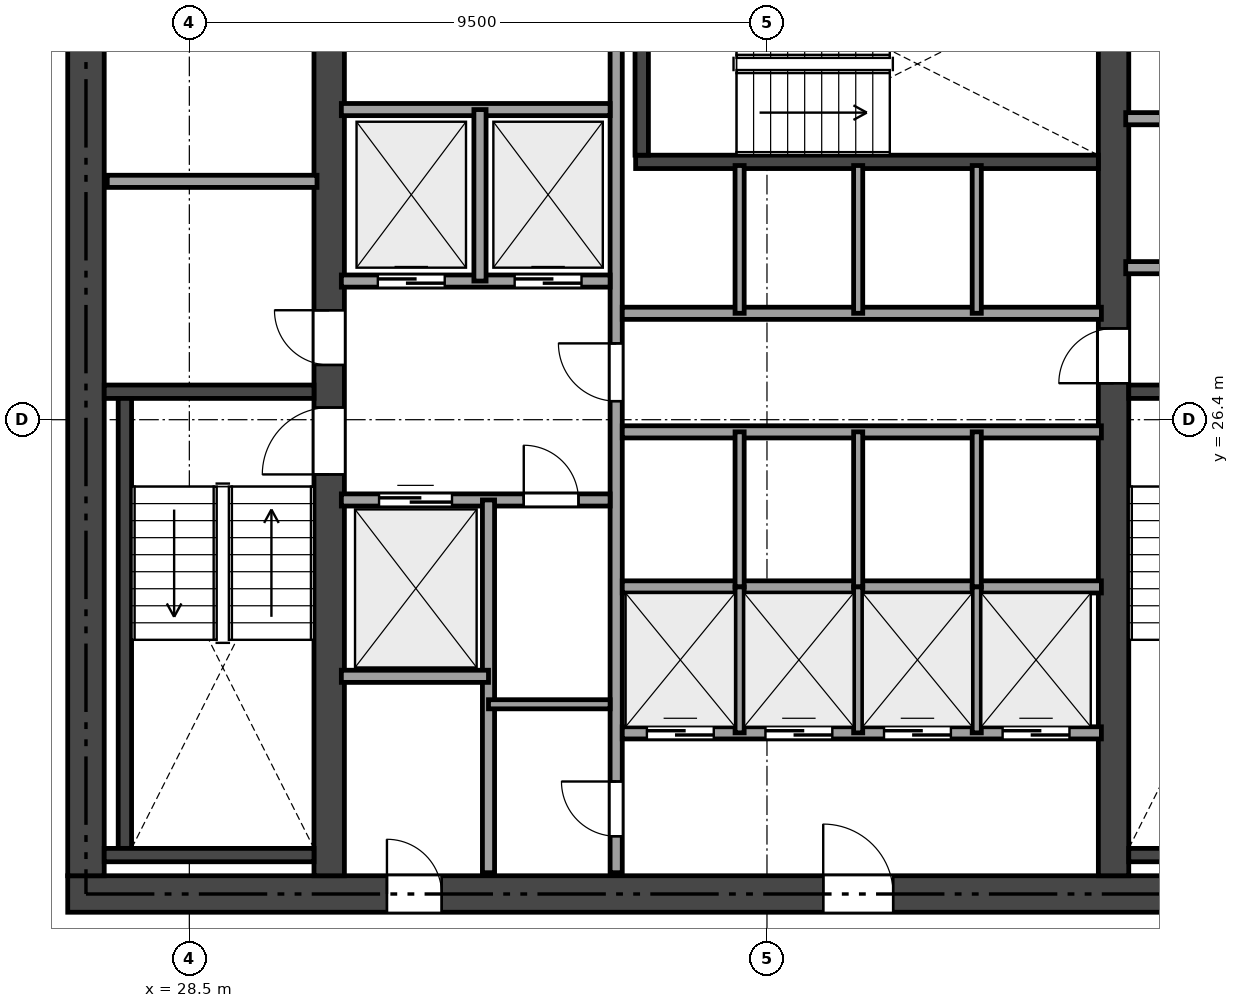
"""IFC4 building model, lengths in metres.
Left out: names, types, materials, properties, quantities, classifications, styles, units other than length and angle.
Written with IfcOpenShell. Run it as: python <this file> out.ifc"""

import sys

from ifc_helpers import new_model, si_unit, direction, frame, frame_2d, origin, place, context, subcontext, project, spatial, rectangle, extrude, element, fill, save


model = new_model("IFC4")
c1 = context("Model", 3, precision=1e-05, world=origin(), true_north=direction((0.0, 1.0)))
c2 = subcontext(c1, "Body", "Model", "MODEL_VIEW")
j1 = project(units=[si_unit("LENGTHUNIT", "METRE"), si_unit("PLANEANGLEUNIT", "RADIAN")], contexts=[c1])
p1 = place(None, origin())
s1 = spatial("IfcSite", under=j1, at=p1, CompositionType="ELEMENT")
p2 = place(p1, origin())
s2 = spatial("IfcBuilding", under=s1, at=p2, CompositionType="ELEMENT")
p3 = place(p2, frame((0.0, 0.0, 117.75)))
s3 = spatial("IfcBuildingStorey", under=s2, at=p3, CompositionType="ELEMENT", Elevation=117.75)
p4 = place(p3, frame((26.5, 18.6, 0.0), z_axis=(0.0, 0.0, 1.0), x_axis=(1.0, 0.0, 0.0)))
e1 = element("IfcWall", 1, at=p4, inside=s3, PredefinedType="SHEAR", context=c2, shape_type="SweptSolid", body=[
    extrude(rectangle(XDim=21.4, YDim=0.6, at=frame_2d((10.7, 0.0))), origin(), (0.0, 0.0, 1.0), 3.09),
])
p5 = place(p4, frame((12.425, 0.0, 0.0)))
e2 = element("IfcOpeningElement", 2, at=p5, cuts=e1, PredefinedType="OPENING", context=c2, shape_type="SweptSolid", body=[
    extrude(rectangle(XDim=1.15, YDim=2.15, at=frame_2d((0.575, 1.075))), frame((0.0, 0.31, 0.0), z_axis=(0.0, -1.0, 0.0), x_axis=(1.0, 0.0, 0.0)), (0.0, 0.0, 1.0), 0.62),
])
p6 = place(p4, frame((5.25, 0.0, 0.0)))
e3 = element("IfcOpeningElement", 3, at=p6, cuts=e1, PredefinedType="OPENING", context=c2, shape_type="SweptSolid", body=[
    extrude(rectangle(XDim=0.9, YDim=2.1, at=frame_2d((0.45, 1.05))), frame((0.0, 0.31, 0.0), z_axis=(0.0, -1.0, 0.0), x_axis=(1.0, 0.0, 0.0)), (0.0, 0.0, 1.0), 0.62),
])
p7 = place(p3, frame((26.8, 18.9, 0.0), z_axis=(0.0, 0.0, 1.0), x_axis=(0.0, 1.0, 0.0)))
e4 = element("IfcWall", 4, at=p7, inside=s3, PredefinedType="SHEAR", context=c2, shape_type="SweptSolid", body=[
    extrude(rectangle(XDim=15.0, YDim=0.6, at=frame_2d((7.5, 0.0))), origin(), (0.0, 0.0, 1.0), 3.09),
])
p8 = place(p3, frame((30.8, 18.9, 0.0), z_axis=(0.0, 0.0, 1.0), x_axis=(0.0, 1.0, 0.0)))
e5 = element("IfcWall", 5, at=p8, inside=s3, PredefinedType="SHEAR", context=c2, shape_type="SweptSolid", body=[
    extrude(rectangle(XDim=15.0, YDim=0.5, at=frame_2d((7.5, 0.0))), origin(), (0.0, 0.0, 1.0), 3.09),
])
p9 = place(p8, frame((6.6, 0.0, 0.0)))
e6 = element("IfcOpeningElement", 6, at=p9, cuts=e5, PredefinedType="OPENING", context=c2, shape_type="SweptSolid", body=[
    extrude(rectangle(XDim=1.1, YDim=2.15, at=frame_2d((0.55, 1.075))), frame((0.0, 0.26, 0.0), z_axis=(0.0, -1.0, 0.0), x_axis=(1.0, 0.0, 0.0)), (0.0, 0.0, 1.0), 0.52),
])
p10 = place(p8, frame((8.4, 0.0, 0.0)))
e7 = element("IfcOpeningElement", 7, at=p10, cuts=e5, PredefinedType="OPENING", context=c2, shape_type="SweptSolid", body=[
    extrude(rectangle(XDim=0.9, YDim=2.1, at=frame_2d((0.45, 1.05))), frame((0.0, 0.26, 0.0), z_axis=(0.0, -1.0, 0.0), x_axis=(1.0, 0.0, 0.0)), (0.0, 0.0, 1.0), 0.52),
])
p11 = place(p3, frame((43.7, 18.9, 0.0), z_axis=(0.0, 0.0, 1.0), x_axis=(0.0, 1.0, 0.0)))
e8 = element("IfcWall", 8, at=p11, inside=s3, PredefinedType="SHEAR", context=c2, shape_type="SweptSolid", body=[
    extrude(rectangle(XDim=15.0, YDim=0.5, at=frame_2d((7.5, 0.0))), origin(), (0.0, 0.0, 1.0), 3.09),
])
p12 = place(p11, frame((8.1, 0.0, 0.0)))
e9 = element("IfcOpeningElement", 9, at=p12, cuts=e8, PredefinedType="OPENING", context=c2, shape_type="SweptSolid", body=[
    extrude(rectangle(XDim=0.9, YDim=2.1, at=frame_2d((0.45, 1.05))), frame((0.0, 0.26, 0.0), z_axis=(0.0, -1.0, 0.0), x_axis=(1.0, 0.0, 0.0)), (0.0, 0.0, 1.0), 0.52),
])
p13 = place(p3, frame((27.1, 26.86, 0.0), z_axis=(0.0, 0.0, 1.0), x_axis=(1.0, 0.0, 0.0)))
e10 = element("IfcWall", 10, at=p13, inside=s3, PredefinedType="SHEAR", context=c2, shape_type="SweptSolid", body=[
    extrude(rectangle(XDim=3.45, YDim=0.22, at=frame_2d((1.725, 0.0))), origin(), (0.0, 0.0, 1.0), 3.09),
])
p14 = place(p3, frame((27.44, 19.35, 0.0), z_axis=(0.0, 0.0, 1.0), x_axis=(0.0, 1.0, 0.0)))
e11 = element("IfcWall", 11, at=p14, inside=s3, PredefinedType="SHEAR", context=c2, shape_type="SweptSolid", body=[
    extrude(rectangle(XDim=7.4, YDim=0.22, at=frame_2d((3.7, 0.0))), origin(), (0.0, 0.0, 1.0), 3.09),
])
p15 = place(p3, frame((27.1, 19.24, 0.0), z_axis=(0.0, 0.0, 1.0), x_axis=(1.0, 0.0, 0.0)))
e12 = element("IfcWall", 12, at=p15, inside=s3, PredefinedType="SHEAR", context=c2, shape_type="SweptSolid", body=[
    extrude(rectangle(XDim=3.45, YDim=0.22, at=frame_2d((1.725, 0.0))), origin(), (0.0, 0.0, 1.0), 3.09),
])
for number, where, z_axis, x_axis in (
    (13, (43.95, 26.86, 0.0), (0.0, 0.0, 1.0), (1.0, 0.0, 0.0)),
    (14, (43.95, 19.24, 0.0), (0.0, 0.0, 1.0), (1.0, 0.0, 0.0)),
):
    element("IfcWall", number, at=place(p3, frame(where, z_axis=z_axis, x_axis=x_axis)), inside=s3, PredefinedType="SHEAR", context=c2, shape_type="SweptSolid", body=[
        extrude(rectangle(XDim=3.35, YDim=0.22, at=frame_2d((1.675, 0.0))), origin(), (0.0, 0.0, 1.0), 3.09),
    ])
p16 = place(p3, frame((35.84, 30.64, 0.0), z_axis=(0.0, 0.0, 1.0), x_axis=(1.0, 0.0, 0.0)))
e15 = element("IfcWall", 15, at=p16, inside=s3, PredefinedType="SHEAR", context=c2, shape_type="SweptSolid", body=[
    extrude(rectangle(XDim=7.61, YDim=0.22, at=frame_2d((3.805, 0.0))), origin(), (0.0, 0.0, 1.0), 3.09),
])
p17 = place(p3, frame((35.94, 30.75, 0.0), z_axis=(0.0, 0.0, 1.0), x_axis=(0.0, 1.0, 0.0)))
e16 = element("IfcWall", 16, at=p17, inside=s3, PredefinedType="SHEAR", context=c2, shape_type="SweptSolid", body=[
    extrude(rectangle(XDim=3.15, YDim=0.22, at=frame_2d((1.575, 0.0))), origin(), (0.0, 0.0, 1.0), 3.09),
])
p18 = place(p3, frame((27.15, 30.32, 0.0), z_axis=(0.0, 0.0, 1.0), x_axis=(1.0, 0.0, 0.0)))
e17 = element("IfcWall", 17, at=p18, inside=s3, PredefinedType="SOLIDWALL", context=c2, shape_type="SweptSolid", body=[
    extrude(rectangle(XDim=3.45, YDim=0.2, at=frame_2d((1.725, 0.0))), origin(), (0.0, 0.0, 1.0), 3.09),
])
p19 = place(p3, frame((43.9, 28.9, 0.0), z_axis=(0.0, 0.0, 1.0), x_axis=(1.0, 0.0, 0.0)))
e18 = element("IfcWall", 18, at=p19, inside=s3, PredefinedType="SOLIDWALL", context=c2, shape_type="SweptSolid", body=[
    extrude(rectangle(XDim=3.35, YDim=0.2, at=frame_2d((1.675, 0.0))), origin(), (0.0, 0.0, 1.0), 3.09),
])
p20 = place(p19, frame((1.15, 0.0, 0.0)))
e19 = element("IfcOpeningElement", 19, at=p20, cuts=e18, PredefinedType="OPENING", context=c2, shape_type="SweptSolid", body=[
    extrude(rectangle(XDim=0.9, YDim=2.1, at=frame_2d((0.45, 1.05))), frame((0.0, 0.11, 0.0), z_axis=(0.0, -1.0, 0.0), x_axis=(1.0, 0.0, 0.0)), (0.0, 0.0, 1.0), 0.22),
])
p21 = place(p3, frame((43.9, 31.35, 0.0), z_axis=(0.0, 0.0, 1.0), x_axis=(1.0, 0.0, 0.0)))
e20 = element("IfcWall", 20, at=p21, inside=s3, PredefinedType="SOLIDWALL", context=c2, shape_type="SweptSolid", body=[
    extrude(rectangle(XDim=3.35, YDim=0.2, at=frame_2d((1.675, 0.0))), origin(), (0.0, 0.0, 1.0), 3.09),
])
p22 = place(p3, frame((35.52, 18.95, 0.0), z_axis=(0.0, 0.0, 1.0), x_axis=(0.0, 1.0, 0.0)))
e21 = element("IfcWall", 21, at=p22, inside=s3, PredefinedType="SOLIDWALL", context=c2, shape_type="SweptSolid", body=[
    extrude(rectangle(XDim=14.9, YDim=0.2, at=frame_2d((7.45, 0.0))), origin(), (0.0, 0.0, 1.0), 2.611),
])
p23 = place(p22, frame((7.755, 0.0, 0.0)))
e22 = element("IfcOpeningElement", 22, at=p23, cuts=e21, PredefinedType="OPENING", context=c2, shape_type="SweptSolid", body=[
    extrude(rectangle(XDim=0.95, YDim=2.15, at=frame_2d((0.475, 1.075))), frame((0.0, 0.11, 0.0), z_axis=(0.0, -1.0, 0.0), x_axis=(1.0, 0.0, 0.0)), (0.0, 0.0, 1.0), 0.22),
])
p24 = place(p22, frame((0.6, 0.0, 0.0)))
e23 = element("IfcOpeningElement", 23, at=p24, cuts=e21, PredefinedType="OPENING", context=c2, shape_type="SweptSolid", body=[
    extrude(rectangle(XDim=0.9, YDim=2.1, at=frame_2d((0.45, 1.05))), frame((0.0, 0.11, 0.0), z_axis=(0.0, -1.0, 0.0), x_axis=(1.0, 0.0, 0.0)), (0.0, 0.0, 1.0), 0.22),
])
p25 = place(p3, frame((31.0, 28.68, 0.0), z_axis=(0.0, 0.0, 1.0), x_axis=(1.0, 0.0, 0.0)))
e24 = element("IfcWall", 24, at=p25, inside=s3, PredefinedType="SOLIDWALL", context=c2, shape_type="SweptSolid", body=[
    extrude(rectangle(XDim=4.42, YDim=0.2, at=frame_2d((2.21, 0.0))), origin(), (0.0, 0.0, 1.0), 3.09),
])
p26 = place(p25, frame((0.6, 0.0, 0.0)))
e25 = element("IfcOpeningElement", 25, at=p26, cuts=e24, PredefinedType="OPENING", context=c2, shape_type="SweptSolid", body=[
    extrude(rectangle(XDim=1.1, YDim=2.15, at=frame_2d((0.55, 1.075))), frame((0.0, 0.11, 0.0), z_axis=(0.0, -1.0, 0.0), x_axis=(1.0, 0.0, 0.0)), (0.0, 0.0, 1.0), 0.22),
])
p27 = place(p25, frame((2.85, 0.0, 0.0)))
e26 = element("IfcOpeningElement", 26, at=p27, cuts=e24, PredefinedType="OPENING", context=c2, shape_type="SweptSolid", body=[
    extrude(rectangle(XDim=1.1, YDim=2.15, at=frame_2d((0.55, 1.075))), frame((0.0, 0.11, 0.0), z_axis=(0.0, -1.0, 0.0), x_axis=(1.0, 0.0, 0.0)), (0.0, 0.0, 1.0), 0.22),
])
p28 = place(p3, frame((31.0, 31.5, 0.0), z_axis=(0.0, 0.0, 1.0), x_axis=(1.0, 0.0, 0.0)))
e27 = element("IfcWall", 27, at=p28, inside=s3, PredefinedType="SOLIDWALL", context=c2, shape_type="SweptSolid", body=[
    extrude(rectangle(XDim=4.42, YDim=0.2, at=frame_2d((2.21, 0.0))), origin(), (0.0, 0.0, 1.0), 3.09),
])
p29 = place(p3, frame((33.28, 28.68, 0.0), z_axis=(0.0, 0.0, 1.0), x_axis=(0.0, 1.0, 0.0)))
e28 = element("IfcWall", 28, at=p29, inside=s3, PredefinedType="SOLIDWALL", context=c2, shape_type="SweptSolid", body=[
    extrude(rectangle(XDim=2.82, YDim=0.2, at=frame_2d((1.41, 0.0))), origin(), (0.0, 0.0, 1.0), 3.09),
])
p30 = place(p3, frame((31.0, 25.08, 0.0), z_axis=(0.0, 0.0, 1.0), x_axis=(1.0, 0.0, 0.0)))
e29 = element("IfcWall", 29, at=p30, inside=s3, PredefinedType="SOLIDWALL", context=c2, shape_type="SweptSolid", body=[
    extrude(rectangle(XDim=4.42, YDim=0.2, at=frame_2d((2.21, 0.0))), origin(), (0.0, 0.0, 1.0), 3.09),
])
p31 = place(p30, frame((3.0, 0.0, 0.0)))
e30 = element("IfcOpeningElement", 30, at=p31, cuts=e29, PredefinedType="OPENING", context=c2, shape_type="SweptSolid", body=[
    extrude(rectangle(XDim=0.9, YDim=2.1, at=frame_2d((0.45, 1.05))), frame((0.0, 0.11, 0.0), z_axis=(0.0, -1.0, 0.0), x_axis=(1.0, 0.0, 0.0)), (0.0, 0.0, 1.0), 0.22),
])
p32 = place(p30, frame((0.62, 0.0, 0.0)))
e31 = element("IfcOpeningElement", 31, at=p32, cuts=e29, PredefinedType="OPENING", context=c2, shape_type="SweptSolid", body=[
    extrude(rectangle(XDim=1.2, YDim=2.15, at=frame_2d((0.6, 1.075))), frame((0.0, 0.11, 0.0), z_axis=(0.0, -1.0, 0.0), x_axis=(1.0, 0.0, 0.0)), (0.0, 0.0, 1.0), 0.22),
])
p33 = place(p3, frame((33.42, 18.95, 0.0), z_axis=(0.0, 0.0, 1.0), x_axis=(0.0, 1.0, 0.0)))
e32 = element("IfcWall", 32, at=p33, inside=s3, PredefinedType="SOLIDWALL", context=c2, shape_type="SweptSolid", body=[
    extrude(rectangle(XDim=6.13, YDim=0.2, at=frame_2d((3.065, 0.0))), origin(), (0.0, 0.0, 1.0), 2.611),
])
p34 = place(p3, frame((31.0, 22.18, 0.0), z_axis=(0.0, 0.0, 1.0), x_axis=(1.0, 0.0, 0.0)))
e33 = element("IfcWall", 33, at=p34, inside=s3, PredefinedType="SOLIDWALL", context=c2, shape_type="SweptSolid", body=[
    extrude(rectangle(XDim=2.42, YDim=0.2, at=frame_2d((1.21, 0.0))), origin(), (0.0, 0.0, 1.0), 3.09),
])
p35 = place(p3, frame((33.42, 21.72, 0.0), z_axis=(0.0, 0.0, 1.0), x_axis=(1.0, 0.0, 0.0)))
e34 = element("IfcWall", 34, at=p35, inside=s3, PredefinedType="PARTITIONING", context=c2, shape_type="SweptSolid", body=[
    extrude(rectangle(XDim=2.0, YDim=0.15, at=frame_2d((1.0, 0.0))), origin(), (0.0, 0.0, 1.0), 3.09),
])
for number, where, z_axis, x_axis in (
    (35, (35.62, 28.15, 0.0), (0.0, 0.0, 1.0), (1.0, 0.0, 0.0)),
    (36, (35.62, 26.2, 0.0), (0.0, 0.0, 1.0), (1.0, 0.0, 0.0)),
):
    element("IfcWall", number, at=place(p3, frame(where, z_axis=z_axis, x_axis=x_axis)), inside=s3, PredefinedType="SOLIDWALL", context=c2, shape_type="SweptSolid", body=[
        extrude(rectangle(XDim=7.88, YDim=0.2, at=frame_2d((3.94, 0.0))), origin(), (0.0, 0.0, 1.0), 3.09),
    ])
p36 = place(p3, frame((35.62, 23.65, 0.0), z_axis=(0.0, 0.0, 1.0), x_axis=(1.0, 0.0, 0.0)))
e37 = element("IfcWall", 37, at=p36, inside=s3, PredefinedType="SOLIDWALL", context=c2, shape_type="SweptSolid", body=[
    extrude(rectangle(XDim=7.88, YDim=0.2, at=frame_2d((3.94, 0.0))), origin(), (0.0, 0.0, 1.0), 2.611),
])
p37 = place(p3, frame((35.62, 21.25, 0.0), z_axis=(0.0, 0.0, 1.0), x_axis=(1.0, 0.0, 0.0)))
e38 = element("IfcWall", 38, at=p37, inside=s3, PredefinedType="SOLIDWALL", context=c2, shape_type="SweptSolid", body=[
    extrude(rectangle(XDim=7.88, YDim=0.2, at=frame_2d((3.94, 0.0))), origin(), (0.0, 0.0, 1.0), 3.09),
])
p38 = place(p37, frame((0.405, 0.0, 0.0)))
e39 = element("IfcOpeningElement", 39, at=p38, cuts=e38, PredefinedType="OPENING", context=c2, shape_type="SweptSolid", body=[
    extrude(rectangle(XDim=1.1, YDim=2.15, at=frame_2d((0.55, 1.075))), frame((0.0, 0.11, 0.0), z_axis=(0.0, -1.0, 0.0), x_axis=(1.0, 0.0, 0.0)), (0.0, 0.0, 1.0), 0.22),
])
p39 = place(p37, frame((2.355, 0.0, 0.0)))
e40 = element("IfcOpeningElement", 40, at=p39, cuts=e38, PredefinedType="OPENING", context=c2, shape_type="SweptSolid", body=[
    extrude(rectangle(XDim=1.1, YDim=2.15, at=frame_2d((0.55, 1.075))), frame((0.0, 0.11, 0.0), z_axis=(0.0, -1.0, 0.0), x_axis=(1.0, 0.0, 0.0)), (0.0, 0.0, 1.0), 0.22),
])
p40 = place(p37, frame((4.305, 0.0, 0.0)))
e41 = element("IfcOpeningElement", 41, at=p40, cuts=e38, PredefinedType="OPENING", context=c2, shape_type="SweptSolid", body=[
    extrude(rectangle(XDim=1.1, YDim=2.15, at=frame_2d((0.55, 1.075))), frame((0.0, 0.11, 0.0), z_axis=(0.0, -1.0, 0.0), x_axis=(1.0, 0.0, 0.0)), (0.0, 0.0, 1.0), 0.22),
])
p41 = place(p37, frame((6.255, 0.0, 0.0)))
e42 = element("IfcOpeningElement", 42, at=p41, cuts=e38, PredefinedType="OPENING", context=c2, shape_type="SweptSolid", body=[
    extrude(rectangle(XDim=1.1, YDim=2.15, at=frame_2d((0.55, 1.075))), frame((0.0, 0.11, 0.0), z_axis=(0.0, -1.0, 0.0), x_axis=(1.0, 0.0, 0.0)), (0.0, 0.0, 1.0), 0.22),
])
for number, where, z_axis, x_axis in (
    (43, (37.55, 28.15, 0.0), (0.0, 0.0, 1.0), (0.0, 1.0, 0.0)),
    (44, (39.5, 28.15, 0.0), (0.0, 0.0, 1.0), (0.0, 1.0, 0.0)),
    (45, (41.45, 28.15, 0.0), (0.0, 0.0, 1.0), (0.0, 1.0, 0.0)),
):
    element("IfcWall", number, at=place(p3, frame(where, z_axis=z_axis, x_axis=x_axis)), inside=s3, PredefinedType="PARTITIONING", context=c2, shape_type="SweptSolid", body=[
        extrude(rectangle(XDim=2.43, YDim=0.15, at=frame_2d((1.215, 0.0))), origin(), (0.0, 0.0, 1.0), 3.09),
    ])
for number, where, z_axis, x_axis in (
    (46, (37.55, 23.65, 0.0), (0.0, 0.0, 1.0), (0.0, 1.0, 0.0)),
    (47, (39.5, 23.65, 0.0), (0.0, 0.0, 1.0), (0.0, 1.0, 0.0)),
    (48, (41.45, 23.65, 0.0), (0.0, 0.0, 1.0), (0.0, 1.0, 0.0)),
):
    element("IfcWall", number, at=place(p3, frame(where, z_axis=z_axis, x_axis=x_axis)), inside=s3, PredefinedType="PARTITIONING", context=c2, shape_type="SweptSolid", body=[
        extrude(rectangle(XDim=2.55, YDim=0.15, at=frame_2d((1.275, 0.0))), origin(), (0.0, 0.0, 1.0), 2.611),
    ])
for number, where, z_axis, x_axis in (
    (49, (37.55, 21.25, 0.0), (0.0, 0.0, 1.0), (0.0, 1.0, 0.0)),
    (50, (39.5, 21.25, 0.0), (0.0, 0.0, 1.0), (0.0, 1.0, 0.0)),
    (51, (41.45, 21.25, 0.0), (0.0, 0.0, 1.0), (0.0, 1.0, 0.0)),
):
    element("IfcWall", number, at=place(p3, frame(where, z_axis=z_axis, x_axis=x_axis)), inside=s3, PredefinedType="PARTITIONING", context=c2, shape_type="SweptSolid", body=[
        extrude(rectangle(XDim=2.4, YDim=0.15, at=frame_2d((1.2, 0.0))), origin(), (0.0, 0.0, 1.0), 2.611),
    ])
p42 = place(p9, origin())
e52 = element("IfcDoor", 52, at=p42, inside=s3, OperationType="SINGLE_SWING_LEFT", PredefinedType="DOOR", context=c2, shape_type="SweptSolid", body=[
    extrude(rectangle(XDim=1.1, YDim=2.15, at=frame_2d((0.55, 1.075))), frame((0.0, 0.025, 0.0), z_axis=(0.0, -1.0, 0.0), x_axis=(1.0, 0.0, 0.0)), (0.0, 0.0, 1.0), 0.05),
])
fill(e6, e52)
p43 = place(p23, origin())
e53 = element("IfcDoor", 53, at=p43, inside=s3, OperationType="SINGLE_SWING_RIGHT", PredefinedType="DOOR", context=c2, shape_type="SweptSolid", body=[
    extrude(rectangle(XDim=0.95, YDim=2.15, at=frame_2d((0.475, 1.075))), frame((0.0, 0.025, 0.0), z_axis=(0.0, -1.0, 0.0), x_axis=(1.0, 0.0, 0.0)), (0.0, 0.0, 1.0), 0.05),
])
fill(e22, e53)
p44 = place(p12, origin())
e54 = element("IfcDoor", 54, at=p44, inside=s3, OperationType="SINGLE_SWING_LEFT", PredefinedType="DOOR", context=c2, shape_type="SweptSolid", body=[
    extrude(rectangle(XDim=0.9, YDim=2.1, at=frame_2d((0.45, 1.05))), frame((0.0, 0.025, 0.0), z_axis=(0.0, -1.0, 0.0), x_axis=(1.0, 0.0, 0.0)), (0.0, 0.0, 1.0), 0.05),
])
fill(e9, e54)
p45 = place(p5, origin())
e55 = element("IfcDoor", 55, at=p45, inside=s3, OperationType="SINGLE_SWING_LEFT", PredefinedType="DOOR", context=c2, shape_type="SweptSolid", body=[
    extrude(rectangle(XDim=1.15, YDim=2.15, at=frame_2d((0.575, 1.075))), frame((0.0, 0.025, 0.0), z_axis=(0.0, -1.0, 0.0), x_axis=(1.0, 0.0, 0.0)), (0.0, 0.0, 1.0), 0.05),
])
fill(e2, e55)
p46 = place(p10, origin())
e56 = element("IfcDoor", 56, at=p46, inside=s3, OperationType="SINGLE_SWING_RIGHT", PredefinedType="DOOR", context=c2, shape_type="SweptSolid", body=[
    extrude(rectangle(XDim=0.9, YDim=2.1, at=frame_2d((0.45, 1.05))), frame((0.0, 0.025, 0.0), z_axis=(0.0, -1.0, 0.0), x_axis=(1.0, 0.0, 0.0)), (0.0, 0.0, 1.0), 0.05),
])
fill(e7, e56)
p47 = place(p6, origin())
e57 = element("IfcDoor", 57, at=p47, inside=s3, OperationType="SINGLE_SWING_LEFT", PredefinedType="DOOR", context=c2, shape_type="SweptSolid", body=[
    extrude(rectangle(XDim=0.9, YDim=2.1, at=frame_2d((0.45, 1.05))), frame((0.0, 0.025, 0.0), z_axis=(0.0, -1.0, 0.0), x_axis=(1.0, 0.0, 0.0)), (0.0, 0.0, 1.0), 0.05),
])
fill(e3, e57)
p48 = place(p24, origin())
e58 = element("IfcDoor", 58, at=p48, inside=s3, OperationType="SINGLE_SWING_RIGHT", PredefinedType="DOOR", context=c2, shape_type="SweptSolid", body=[
    extrude(rectangle(XDim=0.9, YDim=2.1, at=frame_2d((0.45, 1.05))), frame((0.0, 0.025, 0.0), z_axis=(0.0, -1.0, 0.0), x_axis=(1.0, 0.0, 0.0)), (0.0, 0.0, 1.0), 0.05),
])
fill(e23, e58)
p49 = place(p31, origin())
e59 = element("IfcDoor", 59, at=p49, inside=s3, OperationType="SINGLE_SWING_LEFT", PredefinedType="DOOR", context=c2, shape_type="SweptSolid", body=[
    extrude(rectangle(XDim=0.9, YDim=2.1, at=frame_2d((0.45, 1.05))), frame((0.0, 0.025, 0.0), z_axis=(0.0, -1.0, 0.0), x_axis=(1.0, 0.0, 0.0)), (0.0, 0.0, 1.0), 0.05),
])
fill(e30, e59)
p50 = place(p26, origin())
e60 = element("IfcDoor", 60, at=p50, inside=s3, OperationType="SLIDING_TO_LEFT", PredefinedType="DOOR", context=c2, shape_type="SweptSolid", body=[
    extrude(rectangle(XDim=1.1, YDim=2.15, at=frame_2d((0.55, 1.075))), frame((0.0, 0.025, 0.0), z_axis=(0.0, -1.0, 0.0), x_axis=(1.0, 0.0, 0.0)), (0.0, 0.0, 1.0), 0.05),
])
fill(e25, e60)
p51 = place(p27, origin())
e61 = element("IfcDoor", 61, at=p51, inside=s3, OperationType="SLIDING_TO_LEFT", PredefinedType="DOOR", context=c2, shape_type="SweptSolid", body=[
    extrude(rectangle(XDim=1.1, YDim=2.15, at=frame_2d((0.55, 1.075))), frame((0.0, 0.025, 0.0), z_axis=(0.0, -1.0, 0.0), x_axis=(1.0, 0.0, 0.0)), (0.0, 0.0, 1.0), 0.05),
])
fill(e26, e61)
p52 = place(p32, origin())
e62 = element("IfcDoor", 62, at=p52, inside=s3, OperationType="SLIDING_TO_LEFT", PredefinedType="DOOR", context=c2, shape_type="SweptSolid", body=[
    extrude(rectangle(XDim=1.2, YDim=2.15, at=frame_2d((0.6, 1.075))), frame((0.0, 0.025, 0.0), z_axis=(0.0, -1.0, 0.0), x_axis=(1.0, 0.0, 0.0)), (0.0, 0.0, 1.0), 0.05),
])
fill(e31, e62)
p53 = place(p38, origin())
e63 = element("IfcDoor", 63, at=p53, inside=s3, OperationType="SLIDING_TO_LEFT", PredefinedType="DOOR", context=c2, shape_type="SweptSolid", body=[
    extrude(rectangle(XDim=1.1, YDim=2.15, at=frame_2d((0.55, 1.075))), frame((0.0, 0.025, 0.0), z_axis=(0.0, -1.0, 0.0), x_axis=(1.0, 0.0, 0.0)), (0.0, 0.0, 1.0), 0.05),
])
fill(e39, e63)
p54 = place(p39, origin())
e64 = element("IfcDoor", 64, at=p54, inside=s3, OperationType="SLIDING_TO_LEFT", PredefinedType="DOOR", context=c2, shape_type="SweptSolid", body=[
    extrude(rectangle(XDim=1.1, YDim=2.15, at=frame_2d((0.55, 1.075))), frame((0.0, 0.025, 0.0), z_axis=(0.0, -1.0, 0.0), x_axis=(1.0, 0.0, 0.0)), (0.0, 0.0, 1.0), 0.05),
])
fill(e40, e64)
p55 = place(p40, origin())
e65 = element("IfcDoor", 65, at=p55, inside=s3, OperationType="SLIDING_TO_LEFT", PredefinedType="DOOR", context=c2, shape_type="SweptSolid", body=[
    extrude(rectangle(XDim=1.1, YDim=2.15, at=frame_2d((0.55, 1.075))), frame((0.0, 0.025, 0.0), z_axis=(0.0, -1.0, 0.0), x_axis=(1.0, 0.0, 0.0)), (0.0, 0.0, 1.0), 0.05),
])
fill(e41, e65)
p56 = place(p41, origin())
e66 = element("IfcDoor", 66, at=p56, inside=s3, OperationType="SLIDING_TO_LEFT", PredefinedType="DOOR", context=c2, shape_type="SweptSolid", body=[
    extrude(rectangle(XDim=1.1, YDim=2.15, at=frame_2d((0.55, 1.075))), frame((0.0, 0.025, 0.0), z_axis=(0.0, -1.0, 0.0), x_axis=(1.0, 0.0, 0.0)), (0.0, 0.0, 1.0), 0.05),
])
fill(e42, e66)
save(model, sys.argv[1])
